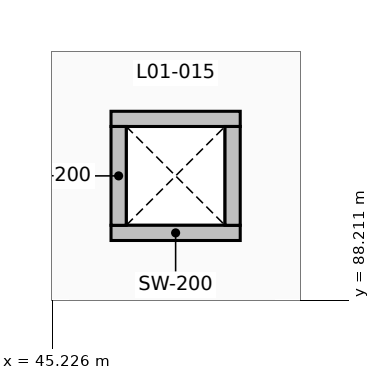
"""IFC4 building model, lengths in metres.
Left out: names, types, materials, properties, quantities, classifications, styles, units other than length and angle.
Written with IfcOpenShell. Run it as: python <this file> out.ifc"""

import sys

from ifc_helpers import new_model, si_unit, direction, frame, frame_2d, origin, place, context, subcontext, project, spatial, rectangle, extrude, element, save


model = new_model("IFC4")
c1 = context("Model", 3, precision=1e-05, world=origin(), true_north=direction((0.0, 1.0)))
c2 = subcontext(c1, "Body", "Model", "MODEL_VIEW")
j1 = project(units=[si_unit("LENGTHUNIT", "METRE"), si_unit("PLANEANGLEUNIT", "RADIAN")], contexts=[c1])
p1 = place(None, origin())
s1 = spatial("IfcSite", under=j1, at=p1, CompositionType="ELEMENT")
p2 = place(p1, origin())
s2 = spatial("IfcBuilding", under=s1, at=p2, CompositionType="ELEMENT")
p3 = place(p2, frame((0.0, 0.0, 5.4)))
s3 = spatial("IfcBuildingStorey", under=s2, at=p3, CompositionType="ELEMENT", Elevation=5.4)
for number, where, z_axis, x_axis in (
    (1, (46.0, 89.1, 0.0), (0.0, 0.0, 1.0), (1.0, 0.0, 0.0)),
    (2, (47.7, 90.6, 0.0), (0.0, 0.0, 1.0), (-1.0, 0.0, 0.0)),
):
    element("IfcWall", number, at=place(p3, frame(where, z_axis=z_axis, x_axis=x_axis)), inside=s3, PredefinedType="PARTITIONING", context=c2, shape_type="SweptSolid", body=[
        extrude(rectangle(XDim=1.7, YDim=0.2, at=frame_2d((0.85, 0.0))), origin(), (0.0, 0.0, 1.0), 4.5),
    ])
for number, where, z_axis, x_axis in (
    (3, (46.1, 89.2, 0.0), (0.0, 0.0, 1.0), (0.0, 1.0, 0.0)),
    (4, (47.6, 90.5, 0.0), (0.0, 0.0, 1.0), (0.0, -1.0, 0.0)),
):
    element("IfcWall", number, at=place(p3, frame(where, z_axis=z_axis, x_axis=x_axis)), inside=s3, PredefinedType="PARTITIONING", context=c2, shape_type="SweptSolid", body=[
        extrude(rectangle(XDim=1.3, YDim=0.2, at=frame_2d((0.65, 0.0))), origin(), (0.0, 0.0, 1.0), 4.5),
    ])
save(model, sys.argv[1])
